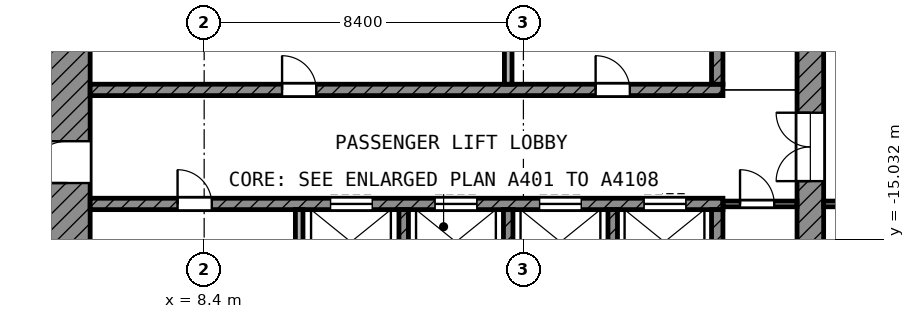
"""IFC4 building model, lengths in metres.
Left out: names, types, materials, properties, quantities, classifications, styles, units other than length and angle.
Written with IfcOpenShell. Run it as: python <this file> out.ifc"""

import sys

from ifc_helpers import new_model, si_unit, direction, frame, frame_2d, origin, place, context, subcontext, project, spatial, rectangle, extrude, element, fill, save


model = new_model("IFC4")
c1 = context("Model", 3, precision=1e-05, world=origin(), true_north=direction((0.0, 1.0)))
c2 = subcontext(c1, "Body", "Model", "MODEL_VIEW")
j1 = project(units=[si_unit("LENGTHUNIT", "METRE"), si_unit("PLANEANGLEUNIT", "RADIAN")], contexts=[c1])
p1 = place(None, origin())
s1 = spatial("IfcSite", under=j1, at=p1, CompositionType="ELEMENT")
p2 = place(p1, origin())
s2 = spatial("IfcBuilding", under=s1, at=p2, CompositionType="ELEMENT")
p3 = place(p2, frame((0.0, 0.0, 290.2)))
s3 = spatial("IfcBuildingStorey", under=s2, at=p3, CompositionType="ELEMENT", Elevation=290.2)
p4 = place(p3, frame((4.8, -24.7, 0.0), z_axis=(0.0, 0.0, 1.0), x_axis=(0.0, 1.0, 0.0)))
e1 = element("IfcWall", 1, at=p4, inside=s3, PredefinedType="SHEAR", context=c2, shape_type="SweptSolid", body=[
    extrude(rectangle(XDim=19.3, YDim=1.2, at=frame_2d((9.65, 0.0))), origin(), (0.0, 0.0, 1.0), 3.6),
])
p5 = place(p4, frame((11.15, 0.0, 0.0)))
e2 = element("IfcOpeningElement", 2, at=p5, cuts=e1, PredefinedType="OPENING", context=c2, shape_type="SweptSolid", body=[
    extrude(rectangle(XDim=1.1, YDim=2.1, at=frame_2d((0.55, 1.05))), frame((0.0, 0.61, 0.0), z_axis=(0.0, -1.0, 0.0), x_axis=(1.0, 0.0, 0.0)), (0.0, 0.0, 1.0), 1.22),
])
p6 = place(p4, frame((1.85, 0.0, 0.0)))
e3 = element("IfcOpeningElement", 3, at=p6, cuts=e1, PredefinedType="OPENING", context=c2, shape_type="SweptSolid", body=[
    extrude(rectangle(XDim=1.1, YDim=2.1, at=frame_2d((0.55, 1.05))), frame((0.0, 0.61, 0.0), z_axis=(0.0, -1.0, 0.0), x_axis=(1.0, 0.0, 0.0)), (0.0, 0.0, 1.0), 1.22),
])
p7 = place(p3, frame((24.35, -24.0, 0.0), z_axis=(0.0, 0.0, 1.0), x_axis=(0.0, 1.0, 0.0)))
e4 = element("IfcWall", 4, at=p7, inside=s3, PredefinedType="SHEAR", context=c2, shape_type="SweptSolid", body=[
    extrude(rectangle(XDim=18.6, YDim=0.7, at=frame_2d((9.3, 0.0))), origin(), (0.0, 0.0, 1.0), 3.6),
])
p8 = place(p7, frame((10.5, 0.0, 0.0)))
e5 = element("IfcOpeningElement", 5, at=p8, cuts=e4, PredefinedType="OPENING", context=c2, shape_type="SweptSolid", body=[
    extrude(rectangle(XDim=1.8, YDim=2.1, at=frame_2d((0.9, 1.05))), frame((0.0, 0.36, 0.0), z_axis=(0.0, -1.0, 0.0), x_axis=(1.0, 0.0, 0.0)), (0.0, 0.0, 1.0), 0.72),
])
p9 = place(p3, frame((5.4, -11.1, 0.0), z_axis=(0.0, 0.0, 1.0), x_axis=(1.0, 0.0, 0.0)))
e6 = element("IfcWall", 6, at=p9, inside=s3, PredefinedType="SHEAR", context=c2, shape_type="SweptSolid", body=[
    extrude(rectangle(XDim=16.65, YDim=0.3, at=frame_2d((8.325, 0.0))), origin(), (0.0, 0.0, 1.0), 3.6),
])
p10 = place(p9, frame((5.05, 0.0, 0.0)))
e7 = element("IfcOpeningElement", 7, at=p10, cuts=e6, PredefinedType="OPENING", context=c2, shape_type="SweptSolid", body=[
    extrude(rectangle(XDim=0.9, YDim=2.1, at=frame_2d((0.45, 1.05))), frame((0.0, 0.16, 0.0), z_axis=(0.0, -1.0, 0.0), x_axis=(1.0, 0.0, 0.0)), (0.0, 0.0, 1.0), 0.32),
])
p11 = place(p9, frame((13.3, 0.0, 0.0)))
e8 = element("IfcOpeningElement", 8, at=p11, cuts=e6, PredefinedType="OPENING", context=c2, shape_type="SweptSolid", body=[
    extrude(rectangle(XDim=0.9, YDim=2.1, at=frame_2d((0.45, 1.05))), frame((0.0, 0.16, 0.0), z_axis=(0.0, -1.0, 0.0), x_axis=(1.0, 0.0, 0.0)), (0.0, 0.0, 1.0), 0.32),
])
p12 = place(p3, frame((5.4, -14.1, 0.0), z_axis=(0.0, 0.0, 1.0), x_axis=(1.0, 0.0, 0.0)))
e9 = element("IfcWall", 9, at=p12, inside=s3, PredefinedType="SHEAR", context=c2, shape_type="SweptSolid", body=[
    extrude(rectangle(XDim=16.65, YDim=0.3, at=frame_2d((8.325, 0.0))), origin(), (0.0, 0.0, 1.0), 3.6),
])
p13 = place(p12, frame((6.325, 0.0, 0.0)))
e10 = element("IfcOpeningElement", 10, at=p13, cuts=e9, PredefinedType="OPENING", context=c2, shape_type="SweptSolid", body=[
    extrude(rectangle(XDim=1.1, YDim=2.1, at=frame_2d((0.55, 1.05))), frame((0.0, 0.16, 0.0), z_axis=(0.0, -1.0, 0.0), x_axis=(1.0, 0.0, 0.0)), (0.0, 0.0, 1.0), 0.32),
])
p14 = place(p12, frame((9.075, 0.0, 0.0)))
e11 = element("IfcOpeningElement", 11, at=p14, cuts=e9, PredefinedType="OPENING", context=c2, shape_type="SweptSolid", body=[
    extrude(rectangle(XDim=1.1, YDim=2.1, at=frame_2d((0.55, 1.05))), frame((0.0, 0.16, 0.0), z_axis=(0.0, -1.0, 0.0), x_axis=(1.0, 0.0, 0.0)), (0.0, 0.0, 1.0), 0.32),
])
p15 = place(p12, frame((11.825, 0.0, 0.0)))
e12 = element("IfcOpeningElement", 12, at=p15, cuts=e9, PredefinedType="OPENING", context=c2, shape_type="SweptSolid", body=[
    extrude(rectangle(XDim=1.1, YDim=2.1, at=frame_2d((0.55, 1.05))), frame((0.0, 0.16, 0.0), z_axis=(0.0, -1.0, 0.0), x_axis=(1.0, 0.0, 0.0)), (0.0, 0.0, 1.0), 0.32),
])
p16 = place(p12, frame((14.575, 0.0, 0.0)))
e13 = element("IfcOpeningElement", 13, at=p16, cuts=e9, PredefinedType="OPENING", context=c2, shape_type="SweptSolid", body=[
    extrude(rectangle(XDim=1.1, YDim=2.1, at=frame_2d((0.55, 1.05))), frame((0.0, 0.16, 0.0), z_axis=(0.0, -1.0, 0.0), x_axis=(1.0, 0.0, 0.0)), (0.0, 0.0, 1.0), 0.32),
])
p17 = place(p12, frame((2.3, 0.0, 0.0)))
e14 = element("IfcOpeningElement", 14, at=p17, cuts=e9, PredefinedType="OPENING", context=c2, shape_type="SweptSolid", body=[
    extrude(rectangle(XDim=0.9, YDim=2.1, at=frame_2d((0.45, 1.05))), frame((0.0, 0.16, 0.0), z_axis=(0.0, -1.0, 0.0), x_axis=(1.0, 0.0, 0.0)), (0.0, 0.0, 1.0), 0.32),
])
p18 = place(p3, frame((21.9, -10.95, 0.0), z_axis=(0.0, 0.0, 1.0), x_axis=(0.0, 1.0, 0.0)))
e15 = element("IfcWall", 15, at=p18, inside=s3, PredefinedType="SHEAR", context=c2, shape_type="SweptSolid", body=[
    extrude(rectangle(XDim=2.35, YDim=0.3, at=frame_2d((1.175, 0.0))), origin(), (0.0, 0.0, 1.0), 3.6),
])
p19 = place(p3, frame((21.9, -16.6, 0.0), z_axis=(0.0, 0.0, 1.0), x_axis=(0.0, 1.0, 0.0)))
e16 = element("IfcWall", 16, at=p19, inside=s3, PredefinedType="SHEAR", context=c2, shape_type="SweptSolid", body=[
    extrude(rectangle(XDim=2.35, YDim=0.3, at=frame_2d((1.175, 0.0))), origin(), (0.0, 0.0, 1.0), 3.6),
])
p20 = place(p3, frame((16.4, -10.95, 0.0), z_axis=(0.0, 0.0, 1.0), x_axis=(0.0, 1.0, 0.0)))
e17 = element("IfcWall", 17, at=p20, inside=s3, PredefinedType="PARTITIONING", context=c2, shape_type="SweptSolid", body=[
    extrude(rectangle(XDim=2.35, YDim=0.2, at=frame_2d((1.175, 0.0))), origin(), (0.0, 0.0, 1.0), 3.6),
])
p21 = place(p3, frame((10.9, -16.6, 0.0), z_axis=(0.0, 0.0, 1.0), x_axis=(0.0, 1.0, 0.0)))
e18 = element("IfcWall", 18, at=p21, inside=s3, PredefinedType="PARTITIONING", context=c2, shape_type="SweptSolid", body=[
    extrude(rectangle(XDim=2.35, YDim=0.2, at=frame_2d((1.175, 0.0))), origin(), (0.0, 0.0, 1.0), 3.6),
])
for number, where, z_axis, x_axis in (
    (19, (13.65, -16.6, 0.0), (0.0, 0.0, 1.0), (0.0, 1.0, 0.0)),
    (20, (16.4, -16.6, 0.0), (0.0, 0.0, 1.0), (0.0, 1.0, 0.0)),
    (21, (19.15, -16.6, 0.0), (0.0, 0.0, 1.0), (0.0, 1.0, 0.0)),
):
    element("IfcWall", number, at=place(p3, frame(where, z_axis=z_axis, x_axis=x_axis)), inside=s3, PredefinedType="SHEAR", context=c2, shape_type="SweptSolid", body=[
        extrude(rectangle(XDim=2.35, YDim=0.25, at=frame_2d((1.175, 0.0))), origin(), (0.0, 0.0, 1.0), 3.6),
    ])
p22 = place(p3, frame((22.05, -14.1, 0.0), z_axis=(0.0, 0.0, 1.0), x_axis=(1.0, 0.0, 0.0)))
e22 = element("IfcWall", 22, at=p22, inside=s3, PredefinedType="PARTITIONING", context=c2, shape_type="SweptSolid", body=[
    extrude(rectangle(XDim=1.95, YDim=0.15, at=frame_2d((0.975, 0.0))), origin(), (0.0, 0.0, 1.0), 3.6),
])
p23 = place(p22, frame((0.45, 0.0, 0.0)))
e23 = element("IfcOpeningElement", 23, at=p23, cuts=e22, PredefinedType="OPENING", context=c2, shape_type="SweptSolid", body=[
    extrude(rectangle(XDim=0.9, YDim=2.1, at=frame_2d((0.45, 1.05))), frame((0.0, 0.085, 0.0), z_axis=(0.0, -1.0, 0.0), x_axis=(1.0, 0.0, 0.0)), (0.0, 0.0, 1.0), 0.17),
])
p24 = place(p3, frame((24.7, -14.1, 0.0), z_axis=(0.0, 0.0, 1.0), x_axis=(1.0, 0.0, 0.0)))
e24 = element("IfcWall", 24, at=p24, inside=s3, PredefinedType="PARTITIONING", context=c2, shape_type="SweptSolid", body=[
    extrude(rectangle(XDim=4.625, YDim=0.15, at=frame_2d((2.312, 0.0))), origin(), (0.0, 0.0, 1.0), 3.6),
])
p25 = place(p24, frame((1.85, 0.0, 0.0)))
e25 = element("IfcOpeningElement", 25, at=p25, cuts=e24, PredefinedType="OPENING", context=c2, shape_type="SweptSolid", body=[
    extrude(rectangle(XDim=1.5, YDim=2.1, at=frame_2d((0.75, 1.05))), frame((0.0, 0.085, 0.0), z_axis=(0.0, -1.0, 0.0), x_axis=(1.0, 0.0, 0.0)), (0.0, 0.0, 1.0), 0.17),
])
p26 = place(p13, origin())
e26 = element("IfcDoor", 26, at=p26, inside=s3, OperationType="DOUBLE_DOOR_SLIDING", PredefinedType="DOOR", context=c2, shape_type="SweptSolid", body=[
    extrude(rectangle(XDim=1.1, YDim=2.1, at=frame_2d((0.55, 1.05))), frame((0.0, 0.025, 0.0), z_axis=(0.0, -1.0, 0.0), x_axis=(1.0, 0.0, 0.0)), (0.0, 0.0, 1.0), 0.05),
])
fill(e10, e26)
p27 = place(p14, origin())
e27 = element("IfcDoor", 27, at=p27, inside=s3, OperationType="DOUBLE_DOOR_SLIDING", PredefinedType="DOOR", context=c2, shape_type="SweptSolid", body=[
    extrude(rectangle(XDim=1.1, YDim=2.1, at=frame_2d((0.55, 1.05))), frame((0.0, 0.025, 0.0), z_axis=(0.0, -1.0, 0.0), x_axis=(1.0, 0.0, 0.0)), (0.0, 0.0, 1.0), 0.05),
])
fill(e11, e27)
p28 = place(p15, origin())
e28 = element("IfcDoor", 28, at=p28, inside=s3, OperationType="DOUBLE_DOOR_SLIDING", PredefinedType="DOOR", context=c2, shape_type="SweptSolid", body=[
    extrude(rectangle(XDim=1.1, YDim=2.1, at=frame_2d((0.55, 1.05))), frame((0.0, 0.025, 0.0), z_axis=(0.0, -1.0, 0.0), x_axis=(1.0, 0.0, 0.0)), (0.0, 0.0, 1.0), 0.05),
])
fill(e12, e28)
p29 = place(p16, origin())
e29 = element("IfcDoor", 29, at=p29, inside=s3, OperationType="DOUBLE_DOOR_SLIDING", PredefinedType="DOOR", context=c2, shape_type="SweptSolid", body=[
    extrude(rectangle(XDim=1.1, YDim=2.1, at=frame_2d((0.55, 1.05))), frame((0.0, 0.025, 0.0), z_axis=(0.0, -1.0, 0.0), x_axis=(1.0, 0.0, 0.0)), (0.0, 0.0, 1.0), 0.05),
])
fill(e13, e29)
p30 = place(p5, origin())
e30 = element("IfcDoor", 30, at=p30, inside=s3, OperationType="SINGLE_SWING_LEFT", PredefinedType="DOOR", context=c2, shape_type="SweptSolid", body=[
    extrude(rectangle(XDim=1.1, YDim=2.1, at=frame_2d((0.55, 1.05))), frame((0.0, 0.025, 0.0), z_axis=(0.0, -1.0, 0.0), x_axis=(1.0, 0.0, 0.0)), (0.0, 0.0, 1.0), 0.05),
])
fill(e2, e30)
p31 = place(p8, origin())
e31 = element("IfcDoor", 31, at=p31, inside=s3, OperationType="DOUBLE_DOOR_SINGLE_SWING", PredefinedType="DOOR", context=c2, shape_type="SweptSolid", body=[
    extrude(rectangle(XDim=1.8, YDim=2.1, at=frame_2d((0.9, 1.05))), frame((0.0, 0.025, 0.0), z_axis=(0.0, -1.0, 0.0), x_axis=(1.0, 0.0, 0.0)), (0.0, 0.0, 1.0), 0.05),
])
fill(e5, e31)
p32 = place(p23, origin())
e32 = element("IfcDoor", 32, at=p32, inside=s3, OperationType="SINGLE_SWING_LEFT", PredefinedType="DOOR", context=c2, shape_type="SweptSolid", body=[
    extrude(rectangle(XDim=0.9, YDim=2.1, at=frame_2d((0.45, 1.05))), frame((0.0, 0.025, 0.0), z_axis=(0.0, -1.0, 0.0), x_axis=(1.0, 0.0, 0.0)), (0.0, 0.0, 1.0), 0.05),
])
fill(e23, e32)
p33 = place(p10, origin())
e33 = element("IfcDoor", 33, at=p33, inside=s3, OperationType="SINGLE_SWING_LEFT", PredefinedType="DOOR", context=c2, shape_type="SweptSolid", body=[
    extrude(rectangle(XDim=0.9, YDim=2.1, at=frame_2d((0.45, 1.05))), frame((0.0, 0.025, 0.0), z_axis=(0.0, -1.0, 0.0), x_axis=(1.0, 0.0, 0.0)), (0.0, 0.0, 1.0), 0.05),
])
fill(e7, e33)
p34 = place(p11, origin())
e34 = element("IfcDoor", 34, at=p34, inside=s3, OperationType="SINGLE_SWING_LEFT", PredefinedType="DOOR", context=c2, shape_type="SweptSolid", body=[
    extrude(rectangle(XDim=0.9, YDim=2.1, at=frame_2d((0.45, 1.05))), frame((0.0, 0.025, 0.0), z_axis=(0.0, -1.0, 0.0), x_axis=(1.0, 0.0, 0.0)), (0.0, 0.0, 1.0), 0.05),
])
fill(e8, e34)
p35 = place(p17, origin())
e35 = element("IfcDoor", 35, at=p35, inside=s3, OperationType="SINGLE_SWING_LEFT", PredefinedType="DOOR", context=c2, shape_type="SweptSolid", body=[
    extrude(rectangle(XDim=0.9, YDim=2.1, at=frame_2d((0.45, 1.05))), frame((0.0, 0.025, 0.0), z_axis=(0.0, -1.0, 0.0), x_axis=(1.0, 0.0, 0.0)), (0.0, 0.0, 1.0), 0.05),
])
fill(e14, e35)
save(model, sys.argv[1])
